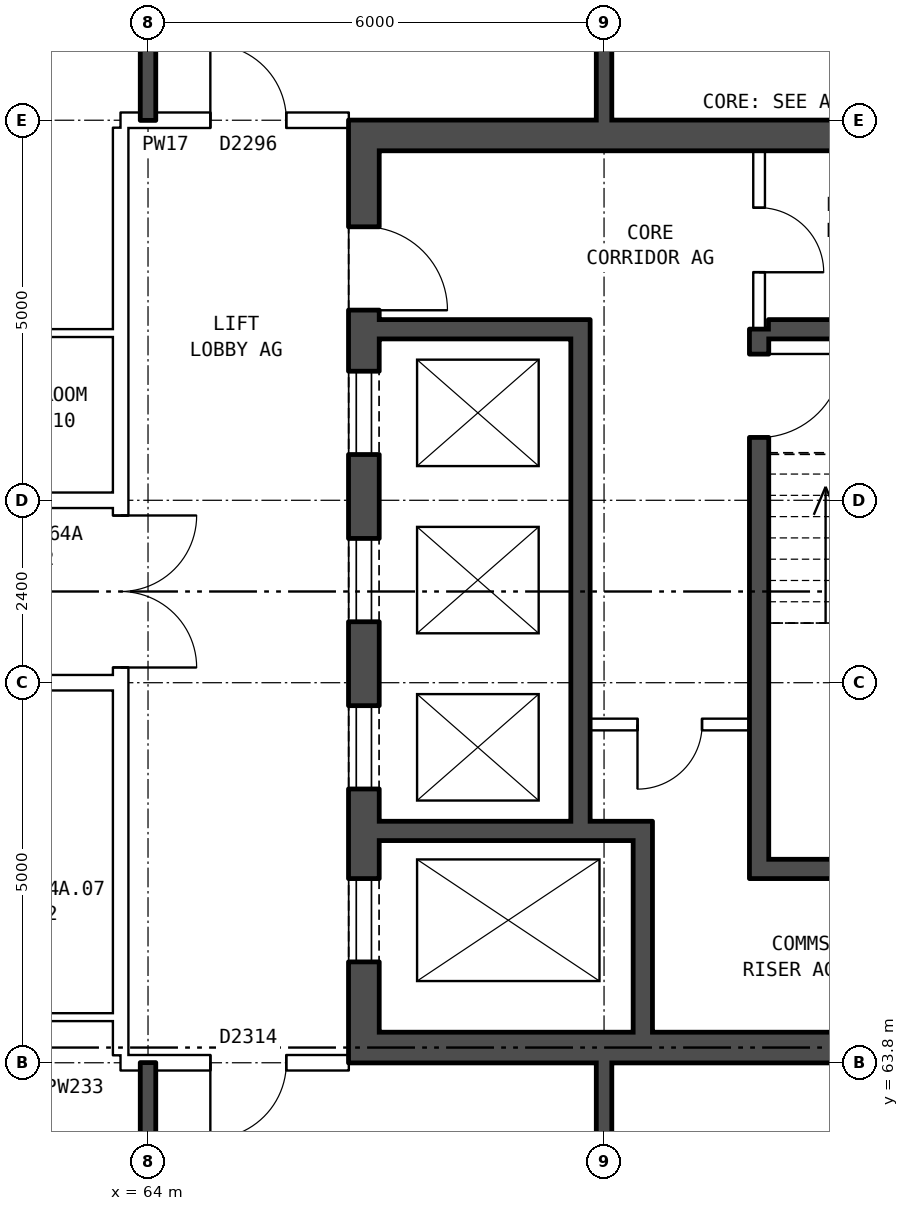
"""IFC4 building model, lengths in metres.
Left out: names, types, materials, properties, quantities, classifications, styles, units other than length and angle.
Written with IfcOpenShell. Run it as: python <this file> out.ifc"""

import sys

from ifc_helpers import new_model, si_unit, direction, frame, frame_2d, origin, place, context, subcontext, project, spatial, rectangle, extrude, element, fill, save


model = new_model("IFC4")
c1 = context("Model", 3, precision=1e-05, world=origin(), true_north=direction((0.0, 1.0)))
c2 = subcontext(c1, "Body", "Model", "MODEL_VIEW")
j1 = project(units=[si_unit("LENGTHUNIT", "METRE"), si_unit("PLANEANGLEUNIT", "RADIAN")], contexts=[c1])
p1 = place(None, origin())
s1 = spatial("IfcSite", under=j1, at=p1, CompositionType="ELEMENT")
p2 = place(p1, origin())
s2 = spatial("IfcBuilding", under=s1, at=p2, CompositionType="ELEMENT")
p3 = place(p2, frame((0.0, 0.0, 227.6)))
s3 = spatial("IfcBuildingStorey", under=s2, at=p3, CompositionType="ELEMENT", Elevation=227.6)
p4 = place(p3, frame((66.84, 63.8, 0.0), z_axis=(0.0, 0.0, 1.0), x_axis=(0.0, 1.0, 0.0)))
e1 = element("IfcWall", 1, at=p4, inside=s3, PredefinedType="SHEAR", context=c2, shape_type="SweptSolid", body=[
    extrude(rectangle(XDim=12.4, YDim=0.4, at=frame_2d((6.2, 0.0))), origin(), (0.0, 0.0, 1.0), 2.85),
])
p5 = place(p4, frame((1.325, 0.0, 0.0)))
e2 = element("IfcOpeningElement", 2, at=p5, cuts=e1, PredefinedType="OPENING", context=c2, shape_type="SweptSolid", body=[
    extrude(rectangle(XDim=1.1, YDim=2.1, at=frame_2d((0.55, 1.05))), frame((0.0, 0.21, 0.0), z_axis=(0.0, -1.0, 0.0), x_axis=(1.0, 0.0, 0.0)), (0.0, 0.0, 1.0), 0.42),
])
p6 = place(p4, frame((3.6, 0.0, 0.0)))
e3 = element("IfcOpeningElement", 3, at=p6, cuts=e1, PredefinedType="OPENING", context=c2, shape_type="SweptSolid", body=[
    extrude(rectangle(XDim=1.1, YDim=2.1, at=frame_2d((0.55, 1.05))), frame((0.0, 0.21, 0.0), z_axis=(0.0, -1.0, 0.0), x_axis=(1.0, 0.0, 0.0)), (0.0, 0.0, 1.0), 0.42),
])
p7 = place(p4, frame((5.8, 0.0, 0.0)))
e4 = element("IfcOpeningElement", 4, at=p7, cuts=e1, PredefinedType="OPENING", context=c2, shape_type="SweptSolid", body=[
    extrude(rectangle(XDim=1.1, YDim=2.1, at=frame_2d((0.55, 1.05))), frame((0.0, 0.21, 0.0), z_axis=(0.0, -1.0, 0.0), x_axis=(1.0, 0.0, 0.0)), (0.0, 0.0, 1.0), 0.42),
])
p8 = place(p4, frame((8.0, 0.0, 0.0)))
e5 = element("IfcOpeningElement", 5, at=p8, cuts=e1, PredefinedType="OPENING", context=c2, shape_type="SweptSolid", body=[
    extrude(rectangle(XDim=1.1, YDim=2.1, at=frame_2d((0.55, 1.05))), frame((0.0, 0.21, 0.0), z_axis=(0.0, -1.0, 0.0), x_axis=(1.0, 0.0, 0.0)), (0.0, 0.0, 1.0), 0.42),
])
p9 = place(p4, frame((9.9, 0.0, 0.0)))
e6 = element("IfcOpeningElement", 6, at=p9, cuts=e1, PredefinedType="OPENING", context=c2, shape_type="SweptSolid", body=[
    extrude(rectangle(XDim=1.1, YDim=2.1, at=frame_2d((0.55, 1.05))), frame((0.0, 0.21, 0.0), z_axis=(0.0, -1.0, 0.0), x_axis=(1.0, 0.0, 0.0)), (0.0, 0.0, 1.0), 0.42),
])
for number, where, z_axis, x_axis in (
    (7, (67.04, 64.0, 0.0), (0.0, 0.0, 1.0), (1.0, 0.0, 0.0)),
    (8, (67.04, 76.0, 0.0), (0.0, 0.0, 1.0), (1.0, 0.0, 0.0)),
):
    element("IfcWall", number, at=place(p3, frame(where, z_axis=z_axis, x_axis=x_axis)), inside=s3, PredefinedType="SHEAR", context=c2, shape_type="SweptSolid", body=[
        extrude(rectangle(XDim=8.2, YDim=0.4, at=frame_2d((4.1, 0.0))), origin(), (0.0, 0.0, 1.0), 2.85),
    ])
p10 = place(p3, frame((72.165, 66.35, 0.0), z_axis=(0.0, 0.0, 1.0), x_axis=(1.0, 0.0, 0.0)))
e9 = element("IfcWall", 9, at=p10, inside=s3, PredefinedType="SHEAR", context=c2, shape_type="SweptSolid", body=[
    extrude(rectangle(XDim=3.075, YDim=0.25, at=frame_2d((1.538, 0.0))), origin(), (0.0, 0.0, 1.0), 2.85),
])
p11 = place(p3, frame((67.04, 66.85, 0.0), z_axis=(0.0, 0.0, 1.0), x_axis=(1.0, 0.0, 0.0)))
e10 = element("IfcWall", 10, at=p11, inside=s3, PredefinedType="SHEAR", context=c2, shape_type="SweptSolid", body=[
    extrude(rectangle(XDim=3.595, YDim=0.25, at=frame_2d((1.797, 0.0))), origin(), (0.0, 0.0, 1.0), 2.85),
])
p12 = place(p3, frame((69.815, 68.25, 0.0), z_axis=(0.0, 0.0, 1.0), x_axis=(1.0, 0.0, 0.0)))
e11 = element("IfcWall", 11, at=p12, inside=s3, PredefinedType="PARTITIONING", context=c2, shape_type="SweptSolid", body=[
    extrude(rectangle(XDim=2.1, YDim=0.15, at=frame_2d((1.05, 0.0))), origin(), (0.0, 0.0, 1.0), 2.85),
])
p13 = place(p12, frame((0.625, 0.0, 0.0)))
e12 = element("IfcOpeningElement", 12, at=p13, cuts=e11, PredefinedType="OPENING", context=c2, shape_type="SweptSolid", body=[
    extrude(rectangle(XDim=0.85, YDim=2.1, at=frame_2d((0.425, 1.05))), frame((0.0, 0.085, 0.0), z_axis=(0.0, -1.0, 0.0), x_axis=(1.0, 0.0, 0.0)), (0.0, 0.0, 1.0), 0.17),
])
p14 = place(p3, frame((67.04, 73.45, 0.0), z_axis=(0.0, 0.0, 1.0), x_axis=(1.0, 0.0, 0.0)))
e13 = element("IfcWall", 13, at=p14, inside=s3, PredefinedType="SHEAR", context=c2, shape_type="SweptSolid", body=[
    extrude(rectangle(XDim=2.525, YDim=0.25, at=frame_2d((1.262, 0.0))), origin(), (0.0, 0.0, 1.0), 2.85),
])
p15 = place(p3, frame((72.165, 73.45, 0.0), z_axis=(0.0, 0.0, 1.0), x_axis=(1.0, 0.0, 0.0)))
e14 = element("IfcWall", 14, at=p15, inside=s3, PredefinedType="SHEAR", context=c2, shape_type="SweptSolid", body=[
    extrude(rectangle(XDim=3.075, YDim=0.25, at=frame_2d((1.538, 0.0))), origin(), (0.0, 0.0, 1.0), 2.85),
])
p16 = place(p3, frame((69.69, 66.975, 0.0), z_axis=(0.0, 0.0, 1.0), x_axis=(0.0, 1.0, 0.0)))
e15 = element("IfcWall", 15, at=p16, inside=s3, PredefinedType="SHEAR", context=c2, shape_type="SweptSolid", body=[
    extrude(rectangle(XDim=6.6, YDim=0.25, at=frame_2d((3.3, 0.0))), origin(), (0.0, 0.0, 1.0), 2.85),
])
p17 = place(p3, frame((70.51, 64.2, 0.0), z_axis=(0.0, 0.0, 1.0), x_axis=(0.0, 1.0, 0.0)))
e16 = element("IfcWall", 16, at=p17, inside=s3, PredefinedType="SHEAR", context=c2, shape_type="SweptSolid", body=[
    extrude(rectangle(XDim=2.525, YDim=0.25, at=frame_2d((1.263, 0.0))), origin(), (0.0, 0.0, 1.0), 2.85),
])
p18 = place(p3, frame((72.04, 66.225, 0.0), z_axis=(0.0, 0.0, 1.0), x_axis=(0.0, 1.0, 0.0)))
e17 = element("IfcWall", 17, at=p18, inside=s3, PredefinedType="SHEAR", context=c2, shape_type="SweptSolid", body=[
    extrude(rectangle(XDim=7.225, YDim=0.25, at=frame_2d((3.612, 0.0))), origin(), (0.0, 0.0, 1.0), 2.85),
])
p19 = place(p18, frame((5.8, 0.0, 0.0)))
e18 = element("IfcOpeningElement", 18, at=p19, cuts=e17, PredefinedType="OPENING", context=c2, shape_type="SweptSolid", body=[
    extrude(rectangle(XDim=1.1, YDim=2.1, at=frame_2d((0.55, 1.05))), frame((0.0, 0.135, 0.0), z_axis=(0.0, -1.0, 0.0), x_axis=(1.0, 0.0, 0.0)), (0.0, 0.0, 1.0), 0.27),
])
p20 = place(p3, frame((72.04, 73.45, 0.0), z_axis=(0.0, 0.0, 1.0), x_axis=(0.0, 1.0, 0.0)))
e19 = element("IfcWall", 19, at=p20, inside=s3, PredefinedType="PARTITIONING", context=c2, shape_type="SweptSolid", body=[
    extrude(rectangle(XDim=2.35, YDim=0.15, at=frame_2d((1.175, 0.0))), origin(), (0.0, 0.0, 1.0), 2.85),
])
p21 = place(p20, frame((0.75, 0.0, 0.0)))
e20 = element("IfcOpeningElement", 20, at=p21, cuts=e19, PredefinedType="OPENING", context=c2, shape_type="SweptSolid", body=[
    extrude(rectangle(XDim=0.85, YDim=2.1, at=frame_2d((0.425, 1.05))), frame((0.0, 0.085, 0.0), z_axis=(0.0, -1.0, 0.0), x_axis=(1.0, 0.0, 0.0)), (0.0, 0.0, 1.0), 0.17),
])
p22 = place(p3, frame((63.64, 63.9, 0.0), z_axis=(0.0, 0.0, 1.0), x_axis=(0.0, 1.0, 0.0)))
e21 = element("IfcWall", 21, at=p22, inside=s3, PredefinedType="PARTITIONING", context=c2, shape_type="SweptSolid", body=[
    extrude(rectangle(XDim=12.2, YDim=0.2, at=frame_2d((6.1, 0.0))), origin(), (0.0, 0.0, 1.0), 2.85),
])
p23 = place(p22, frame((5.1, 0.0, 0.0)))
e22 = element("IfcOpeningElement", 22, at=p23, cuts=e21, PredefinedType="OPENING", context=c2, shape_type="SweptSolid", body=[
    extrude(rectangle(XDim=2.0, YDim=2.1, at=frame_2d((1.0, 1.05))), frame((0.0, 0.11, 0.0), z_axis=(0.0, -1.0, 0.0), x_axis=(1.0, 0.0, 0.0)), (0.0, 0.0, 1.0), 0.22),
])
p24 = place(p3, frame((63.64, 63.8, 0.0), z_axis=(0.0, 0.0, 1.0), x_axis=(1.0, 0.0, 0.0)))
e23 = element("IfcWall", 23, at=p24, inside=s3, PredefinedType="PARTITIONING", context=c2, shape_type="SweptSolid", body=[
    extrude(rectangle(XDim=3.0, YDim=0.2, at=frame_2d((1.5, 0.0))), origin(), (0.0, 0.0, 1.0), 2.85),
])
p25 = place(p24, frame((1.18, 0.0, 0.0)))
e24 = element("IfcOpeningElement", 24, at=p25, cuts=e23, PredefinedType="OPENING", context=c2, shape_type="SweptSolid", body=[
    extrude(rectangle(XDim=1.0, YDim=2.1, at=frame_2d((0.5, 1.05))), frame((0.0, 0.11, 0.0), z_axis=(0.0, -1.0, 0.0), x_axis=(1.0, 0.0, 0.0)), (0.0, 0.0, 1.0), 0.22),
])
p26 = place(p3, frame((61.0, 64.4, 0.0), z_axis=(0.0, 0.0, 1.0), x_axis=(1.0, 0.0, 0.0)))
e25 = element("IfcWall", 25, at=p26, inside=s3, PredefinedType="PARTITIONING", context=c2, shape_type="SweptSolid", body=[
    extrude(rectangle(XDim=2.64, YDim=0.1, at=frame_2d((1.32, 0.0))), origin(), (0.0, 0.0, 1.0), 2.85),
])
p27 = place(p3, frame((44.36, 68.8, 0.0), z_axis=(0.0, 0.0, 1.0), x_axis=(1.0, 0.0, 0.0)))
e26 = element("IfcWall", 26, at=p27, inside=s3, PredefinedType="PARTITIONING", context=c2, shape_type="SweptSolid", body=[
    extrude(rectangle(XDim=19.28, YDim=0.2, at=frame_2d((9.64, 0.0))), origin(), (0.0, 0.0, 1.0), 2.85),
])
p28 = place(p27, frame((14.64, 0.0, 0.0)))
e27 = element("IfcOpeningElement", 27, at=p28, cuts=e26, PredefinedType="OPENING", context=c2, shape_type="SweptSolid", body=[
    extrude(rectangle(XDim=1.0, YDim=2.1, at=frame_2d((0.5, 1.05))), frame((0.0, 0.11, 0.0), z_axis=(0.0, -1.0, 0.0), x_axis=(1.0, 0.0, 0.0)), (0.0, 0.0, 1.0), 0.22),
])
p29 = place(p27, frame((8.64, 0.0, 0.0)))
e28 = element("IfcOpeningElement", 28, at=p29, cuts=e26, PredefinedType="OPENING", context=c2, shape_type="SweptSolid", body=[
    extrude(rectangle(XDim=1.0, YDim=2.1, at=frame_2d((0.5, 1.05))), frame((0.0, 0.11, 0.0), z_axis=(0.0, -1.0, 0.0), x_axis=(1.0, 0.0, 0.0)), (0.0, 0.0, 1.0), 0.22),
])
p30 = place(p27, frame((5.64, 0.0, 0.0)))
e29 = element("IfcOpeningElement", 29, at=p30, cuts=e26, PredefinedType="OPENING", context=c2, shape_type="SweptSolid", body=[
    extrude(rectangle(XDim=1.0, YDim=2.1, at=frame_2d((0.5, 1.05))), frame((0.0, 0.11, 0.0), z_axis=(0.0, -1.0, 0.0), x_axis=(1.0, 0.0, 0.0)), (0.0, 0.0, 1.0), 0.22),
])
p31 = place(p3, frame((44.36, 71.2, 0.0), z_axis=(0.0, 0.0, 1.0), x_axis=(1.0, 0.0, 0.0)))
e30 = element("IfcWall", 30, at=p31, inside=s3, PredefinedType="PARTITIONING", context=c2, shape_type="SweptSolid", body=[
    extrude(rectangle(XDim=19.28, YDim=0.2, at=frame_2d((9.64, 0.0))), origin(), (0.0, 0.0, 1.0), 2.85),
])
p32 = place(p31, frame((14.64, 0.0, 0.0)))
e31 = element("IfcOpeningElement", 31, at=p32, cuts=e30, PredefinedType="OPENING", context=c2, shape_type="SweptSolid", body=[
    extrude(rectangle(XDim=1.0, YDim=2.1, at=frame_2d((0.5, 1.05))), frame((0.0, 0.11, 0.0), z_axis=(0.0, -1.0, 0.0), x_axis=(1.0, 0.0, 0.0)), (0.0, 0.0, 1.0), 0.22),
])
p33 = place(p31, frame((5.64, 0.0, 0.0)))
e32 = element("IfcOpeningElement", 32, at=p33, cuts=e30, PredefinedType="OPENING", context=c2, shape_type="SweptSolid", body=[
    extrude(rectangle(XDim=1.0, YDim=2.1, at=frame_2d((0.5, 1.05))), frame((0.0, 0.11, 0.0), z_axis=(0.0, -1.0, 0.0), x_axis=(1.0, 0.0, 0.0)), (0.0, 0.0, 1.0), 0.22),
])
p34 = place(p3, frame((61.0, 73.4, 0.0), z_axis=(0.0, 0.0, 1.0), x_axis=(1.0, 0.0, 0.0)))
e33 = element("IfcWall", 33, at=p34, inside=s3, PredefinedType="PARTITIONING", context=c2, shape_type="SweptSolid", body=[
    extrude(rectangle(XDim=2.64, YDim=0.1, at=frame_2d((1.32, 0.0))), origin(), (0.0, 0.0, 1.0), 2.85),
])
p35 = place(p3, frame((63.64, 76.2, 0.0), z_axis=(0.0, 0.0, 1.0), x_axis=(1.0, 0.0, 0.0)))
e34 = element("IfcWall", 34, at=p35, inside=s3, PredefinedType="PARTITIONING", context=c2, shape_type="SweptSolid", body=[
    extrude(rectangle(XDim=3.0, YDim=0.2, at=frame_2d((1.5, 0.0))), origin(), (0.0, 0.0, 1.0), 2.85),
])
p36 = place(p35, frame((1.18, 0.0, 0.0)))
e35 = element("IfcOpeningElement", 35, at=p36, cuts=e34, PredefinedType="OPENING", context=c2, shape_type="SweptSolid", body=[
    extrude(rectangle(XDim=1.0, YDim=2.1, at=frame_2d((0.5, 1.05))), frame((0.0, 0.11, 0.0), z_axis=(0.0, -1.0, 0.0), x_axis=(1.0, 0.0, 0.0)), (0.0, 0.0, 1.0), 0.22),
])
for number, where, z_axis, x_axis in (
    (36, (64.0, 54.36, 0.0), (0.0, 0.0, 1.0), (0.0, 1.0, 0.0)),
    (37, (64.0, 76.2, 0.0), (0.0, 0.0, 1.0), (0.0, 1.0, 0.0)),
):
    element("IfcWall", number, at=place(p3, frame(where, z_axis=z_axis, x_axis=x_axis)), inside=s3, PredefinedType="SOLIDWALL", context=c2, shape_type="SweptSolid", body=[
        extrude(rectangle(XDim=9.44, YDim=0.2, at=frame_2d((4.72, 0.0))), origin(), (0.0, 0.0, 1.0), 2.85),
    ])
p37 = place(p3, frame((70.0, 54.36, 0.0), z_axis=(0.0, 0.0, 1.0), x_axis=(0.0, 1.0, 0.0)))
e38 = element("IfcWall", 38, at=p37, inside=s3, PredefinedType="SOLIDWALL", context=c2, shape_type="SweptSolid", body=[
    extrude(rectangle(XDim=9.44, YDim=0.2, at=frame_2d((4.72, 0.0))), origin(), (0.0, 0.0, 1.0), 2.85),
])
p38 = place(p37, frame((2.32, 0.0, 0.0)))
e39 = element("IfcOpeningElement", 39, at=p38, cuts=e38, PredefinedType="OPENING", context=c2, shape_type="SweptSolid", body=[
    extrude(rectangle(XDim=0.9, YDim=2.1, at=frame_2d((0.45, 1.05))), frame((0.0, 0.11, 0.0), z_axis=(0.0, -1.0, 0.0), x_axis=(1.0, 0.0, 0.0)), (0.0, 0.0, 1.0), 0.22),
])
p39 = place(p37, frame((7.39, 0.0, 0.0)))
e40 = element("IfcOpeningElement", 40, at=p39, cuts=e38, PredefinedType="OPENING", context=c2, shape_type="SweptSolid", body=[
    extrude(rectangle(XDim=0.8, YDim=2.1, at=frame_2d((0.4, 1.05))), frame((0.0, 0.11, 0.0), z_axis=(0.0, -1.0, 0.0), x_axis=(1.0, 0.0, 0.0)), (0.0, 0.0, 1.0), 0.22),
])
p40 = place(p3, frame((70.0, 76.2, 0.0), z_axis=(0.0, 0.0, 1.0), x_axis=(0.0, 1.0, 0.0)))
e41 = element("IfcWall", 41, at=p40, inside=s3, PredefinedType="SOLIDWALL", context=c2, shape_type="SweptSolid", body=[
    extrude(rectangle(XDim=9.44, YDim=0.2, at=frame_2d((4.72, 0.0))), origin(), (0.0, 0.0, 1.0), 2.85),
])
p41 = place(p40, frame((5.92, 0.0, 0.0)))
e42 = element("IfcOpeningElement", 42, at=p41, cuts=e41, PredefinedType="OPENING", context=c2, shape_type="SweptSolid", body=[
    extrude(rectangle(XDim=0.9, YDim=2.1, at=frame_2d((0.45, 1.05))), frame((0.0, 0.11, 0.0), z_axis=(0.0, -1.0, 0.0), x_axis=(1.0, 0.0, 0.0)), (0.0, 0.0, 1.0), 0.22),
])
p42 = place(p40, frame((1.25, 0.0, 0.0)))
e43 = element("IfcOpeningElement", 43, at=p42, cuts=e41, PredefinedType="OPENING", context=c2, shape_type="SweptSolid", body=[
    extrude(rectangle(XDim=0.8, YDim=2.1, at=frame_2d((0.4, 1.05))), frame((0.0, 0.11, 0.0), z_axis=(0.0, -1.0, 0.0), x_axis=(1.0, 0.0, 0.0)), (0.0, 0.0, 1.0), 0.22),
])
p43 = place(p5, origin())
e44 = element("IfcDoor", 44, at=p43, inside=s3, OperationType="DOUBLE_DOOR_SLIDING", PredefinedType="DOOR", context=c2, shape_type="SweptSolid", body=[
    extrude(rectangle(XDim=1.1, YDim=2.1, at=frame_2d((0.55, 1.05))), frame((0.0, -0.135, 0.0), z_axis=(0.0, -1.0, 0.0), x_axis=(1.0, 0.0, 0.0)), (0.0, 0.0, 1.0), 0.05),
])
fill(e2, e44)
p44 = place(p6, origin())
e45 = element("IfcDoor", 45, at=p44, inside=s3, OperationType="DOUBLE_DOOR_SLIDING", PredefinedType="DOOR", context=c2, shape_type="SweptSolid", body=[
    extrude(rectangle(XDim=1.1, YDim=2.1, at=frame_2d((0.55, 1.05))), frame((0.0, -0.135, 0.0), z_axis=(0.0, -1.0, 0.0), x_axis=(1.0, 0.0, 0.0)), (0.0, 0.0, 1.0), 0.05),
])
fill(e3, e45)
p45 = place(p7, origin())
e46 = element("IfcDoor", 46, at=p45, inside=s3, OperationType="DOUBLE_DOOR_SLIDING", PredefinedType="DOOR", context=c2, shape_type="SweptSolid", body=[
    extrude(rectangle(XDim=1.1, YDim=2.1, at=frame_2d((0.55, 1.05))), frame((0.0, -0.135, 0.0), z_axis=(0.0, -1.0, 0.0), x_axis=(1.0, 0.0, 0.0)), (0.0, 0.0, 1.0), 0.05),
])
fill(e4, e46)
p46 = place(p8, origin())
e47 = element("IfcDoor", 47, at=p46, inside=s3, OperationType="DOUBLE_DOOR_SLIDING", PredefinedType="DOOR", context=c2, shape_type="SweptSolid", body=[
    extrude(rectangle(XDim=1.1, YDim=2.1, at=frame_2d((0.55, 1.05))), frame((0.0, -0.135, 0.0), z_axis=(0.0, -1.0, 0.0), x_axis=(1.0, 0.0, 0.0)), (0.0, 0.0, 1.0), 0.05),
])
fill(e5, e47)
p47 = place(p9, frame((1.1, 0.0, 0.0), z_axis=(0.0, 0.0, 1.0), x_axis=(-1.0, 0.0, 0.0)))
e48 = element("IfcDoor", 48, at=p47, inside=s3, OperationType="SINGLE_SWING_RIGHT", PredefinedType="DOOR", context=c2, shape_type="SweptSolid", body=[
    extrude(rectangle(XDim=1.1, YDim=2.1, at=frame_2d((0.55, 1.05))), frame((0.0, 0.185, 0.0), z_axis=(0.0, -1.0, 0.0), x_axis=(1.0, 0.0, 0.0)), (0.0, 0.0, 1.0), 0.05),
])
fill(e6, e48)
p48 = place(p19, frame((1.1, 0.0, 0.0), z_axis=(0.0, 0.0, 1.0), x_axis=(-1.0, 0.0, 0.0)))
e49 = element("IfcDoor", 49, at=p48, inside=s3, OperationType="SINGLE_SWING_LEFT", PredefinedType="DOOR", context=c2, shape_type="SweptSolid", body=[
    extrude(rectangle(XDim=1.1, YDim=2.1, at=frame_2d((0.55, 1.05))), frame((0.0, 0.025, 0.0), z_axis=(0.0, -1.0, 0.0), x_axis=(1.0, 0.0, 0.0)), (0.0, 0.0, 1.0), 0.05),
])
fill(e18, e49)
p49 = place(p13, frame((0.85, 0.0, 0.0), z_axis=(0.0, 0.0, 1.0), x_axis=(-1.0, 0.0, 0.0)))
e50 = element("IfcDoor", 50, at=p49, inside=s3, OperationType="SINGLE_SWING_RIGHT", PredefinedType="DOOR", context=c2, shape_type="SweptSolid", body=[
    extrude(rectangle(XDim=0.85, YDim=2.1, at=frame_2d((0.425, 1.05))), frame((0.0, 0.025, 0.0), z_axis=(0.0, -1.0, 0.0), x_axis=(1.0, 0.0, 0.0)), (0.0, 0.0, 1.0), 0.05),
])
fill(e12, e50)
p50 = place(p21, frame((0.85, 0.0, 0.0), z_axis=(0.0, 0.0, 1.0), x_axis=(-1.0, 0.0, 0.0)))
e51 = element("IfcDoor", 51, at=p50, inside=s3, OperationType="SINGLE_SWING_RIGHT", PredefinedType="DOOR", context=c2, shape_type="SweptSolid", body=[
    extrude(rectangle(XDim=0.85, YDim=2.1, at=frame_2d((0.425, 1.05))), frame((0.0, 0.025, 0.0), z_axis=(0.0, -1.0, 0.0), x_axis=(1.0, 0.0, 0.0)), (0.0, 0.0, 1.0), 0.05),
])
fill(e20, e51)
p51 = place(p23, frame((2.0, 0.0, 0.0), z_axis=(0.0, 0.0, 1.0), x_axis=(-1.0, 0.0, 0.0)))
e52 = element("IfcDoor", 52, at=p51, inside=s3, OperationType="DOUBLE_DOOR_SINGLE_SWING", PredefinedType="DOOR", context=c2, shape_type="SweptSolid", body=[
    extrude(rectangle(XDim=2.0, YDim=2.1, at=frame_2d((1.0, 1.05))), frame((0.0, 0.025, 0.0), z_axis=(0.0, -1.0, 0.0), x_axis=(1.0, 0.0, 0.0)), (0.0, 0.0, 1.0), 0.05),
])
fill(e22, e52)
p52 = place(p25, frame((1.0, 0.0, 0.0), z_axis=(0.0, 0.0, 1.0), x_axis=(-1.0, 0.0, 0.0)))
e53 = element("IfcDoor", 53, at=p52, inside=s3, OperationType="SINGLE_SWING_RIGHT", PredefinedType="DOOR", context=c2, shape_type="SweptSolid", body=[
    extrude(rectangle(XDim=1.0, YDim=2.1, at=frame_2d((0.5, 1.05))), frame((0.0, 0.025, 0.0), z_axis=(0.0, -1.0, 0.0), x_axis=(1.0, 0.0, 0.0)), (0.0, 0.0, 1.0), 0.05),
])
fill(e24, e53)
p53 = place(p36, origin())
e54 = element("IfcDoor", 54, at=p53, inside=s3, OperationType="SINGLE_SWING_LEFT", PredefinedType="DOOR", context=c2, shape_type="SweptSolid", body=[
    extrude(rectangle(XDim=1.0, YDim=2.1, at=frame_2d((0.5, 1.05))), frame((0.0, 0.025, 0.0), z_axis=(0.0, -1.0, 0.0), x_axis=(1.0, 0.0, 0.0)), (0.0, 0.0, 1.0), 0.05),
])
fill(e35, e54)
save(model, sys.argv[1])
